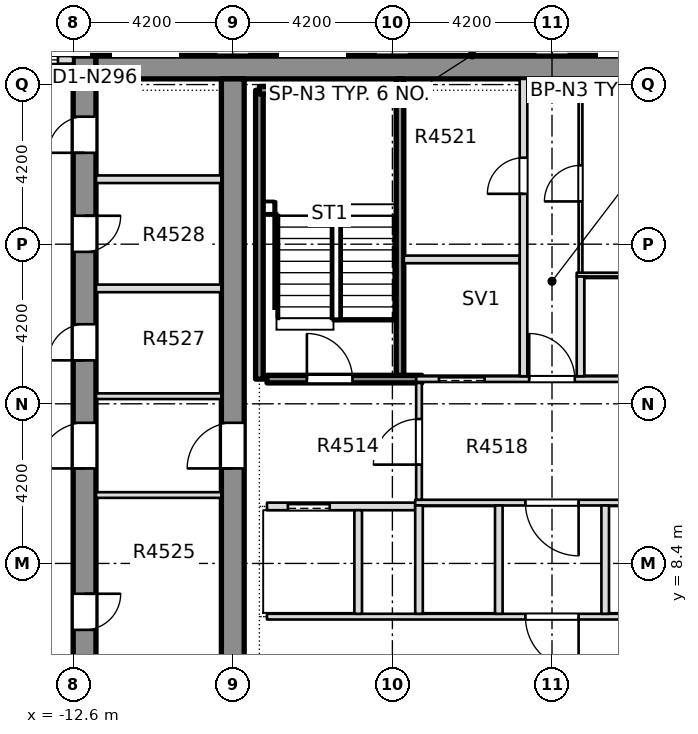
"""IFC4 building model, lengths in metres.
Left out: names, types, materials, properties, quantities, classifications, styles, units other than length and angle.
Written with IfcOpenShell. Run it as: python <this file> out.ifc"""

import sys

from ifc_helpers import new_model, si_unit, direction, frame, frame_2d, origin, place, context, subcontext, project, spatial, rectangle, extrude, element, fill, save


model = new_model("IFC4")
c1 = context("Model", 3, precision=1e-05, world=origin(), true_north=direction((0.0, 1.0)))
c2 = subcontext(c1, "Body", "Model", "MODEL_VIEW")
j1 = project(units=[si_unit("LENGTHUNIT", "METRE"), si_unit("PLANEANGLEUNIT", "RADIAN")], contexts=[c1])
p1 = place(None, origin())
s1 = spatial("IfcSite", under=j1, at=p1, CompositionType="ELEMENT")
p2 = place(p1, origin())
s2 = spatial("IfcBuilding", under=s1, at=p2, CompositionType="ELEMENT")
p3 = place(p2, frame((0.0, 0.0, 175.55)))
s3 = spatial("IfcBuildingStorey", under=s2, at=p3, CompositionType="ELEMENT", Elevation=175.55)
p4 = place(p3, frame((-12.3, -8.4, -0.4), z_axis=(0.0, 0.0, 1.0), x_axis=(0.0, 1.0, 0.0)))
e1 = element("IfcWall", 1, at=p4, inside=s3, PredefinedType="SHEAR", context=c2, shape_type="SweptSolid", body=[
    extrude(rectangle(XDim=30.15, YDim=0.6, at=frame_2d((15.075, 0.0))), origin(), (0.0, 0.0, 1.0), 3.45),
])
p5 = place(p4, frame((4.113, 0.0, 0.4)))
e2 = element("IfcOpeningElement", 2, at=p5, cuts=e1, PredefinedType="OPENING", context=c2, shape_type="SweptSolid", body=[
    extrude(rectangle(XDim=0.95, YDim=2.1, at=frame_2d((0.475, 1.05))), frame((0.0, 0.31, 0.0), z_axis=(0.0, -1.0, 0.0), x_axis=(1.0, 0.0, 0.0)), (0.0, 0.0, 1.0), 0.62),
])
p6 = place(p4, frame((9.89, 0.0, 0.4)))
e3 = element("IfcOpeningElement", 3, at=p6, cuts=e1, PredefinedType="OPENING", context=c2, shape_type="SweptSolid", body=[
    extrude(rectangle(XDim=0.95, YDim=2.1, at=frame_2d((0.475, 1.05))), frame((0.0, 0.31, 0.0), z_axis=(0.0, -1.0, 0.0), x_axis=(1.0, 0.0, 0.0)), (0.0, 0.0, 1.0), 0.62),
])
p7 = place(p4, frame((15.052, 0.0, 0.4)))
e4 = element("IfcOpeningElement", 4, at=p7, cuts=e1, PredefinedType="OPENING", context=c2, shape_type="SweptSolid", body=[
    extrude(rectangle(XDim=0.95, YDim=2.1, at=frame_2d((0.475, 1.05))), frame((0.0, 0.31, 0.0), z_axis=(0.0, -1.0, 0.0), x_axis=(1.0, 0.0, 0.0)), (0.0, 0.0, 1.0), 0.62),
])
p8 = place(p4, frame((22.144, 0.0, 0.4)))
e5 = element("IfcOpeningElement", 5, at=p8, cuts=e1, PredefinedType="OPENING", context=c2, shape_type="SweptSolid", body=[
    extrude(rectangle(XDim=0.95, YDim=2.1, at=frame_2d((0.475, 1.05))), frame((0.0, 0.31, 0.0), z_axis=(0.0, -1.0, 0.0), x_axis=(1.0, 0.0, 0.0)), (0.0, 0.0, 1.0), 0.62),
])
p9 = place(p4, frame((24.998, 0.0, 0.4)))
e6 = element("IfcOpeningElement", 6, at=p9, cuts=e1, PredefinedType="OPENING", context=c2, shape_type="SweptSolid", body=[
    extrude(rectangle(XDim=0.95, YDim=2.1, at=frame_2d((0.475, 1.05))), frame((0.0, 0.31, 0.0), z_axis=(0.0, -1.0, 0.0), x_axis=(1.0, 0.0, 0.0)), (0.0, 0.0, 1.0), 0.62),
])
p10 = place(p4, frame((27.605, 0.0, 0.4)))
e7 = element("IfcOpeningElement", 7, at=p10, cuts=e1, PredefinedType="OPENING", context=c2, shape_type="SweptSolid", body=[
    extrude(rectangle(XDim=0.95, YDim=2.1, at=frame_2d((0.475, 1.05))), frame((0.0, 0.31, 0.0), z_axis=(0.0, -1.0, 0.0), x_axis=(1.0, 0.0, 0.0)), (0.0, 0.0, 1.0), 0.62),
])
p11 = place(p4, frame((19.3, 0.0, 0.4)))
e8 = element("IfcOpeningElement", 8, at=p11, cuts=e1, PredefinedType="OPENING", context=c2, shape_type="SweptSolid", body=[
    extrude(rectangle(XDim=1.2, YDim=2.1, at=frame_2d((0.6, 1.05))), frame((0.0, 0.31, 0.0), z_axis=(0.0, -1.0, 0.0), x_axis=(1.0, 0.0, 0.0)), (0.0, 0.0, 1.0), 0.62),
])
p12 = place(p3, frame((-12.0, 21.45, -0.4), z_axis=(0.0, 0.0, 1.0), x_axis=(1.0, 0.0, 0.0)))
e9 = element("IfcWall", 9, at=p12, inside=s3, PredefinedType="SHEAR", context=c2, shape_type="SweptSolid", body=[
    extrude(rectangle(XDim=24.0, YDim=0.6, at=frame_2d((12.0, 0.0))), origin(), (0.0, 0.0, 1.0), 3.45),
])
p13 = place(p3, frame((-8.4, -7.8, -0.4), z_axis=(0.0, 0.0, 1.0), x_axis=(0.0, 1.0, 0.0)))
e10 = element("IfcWall", 10, at=p13, inside=s3, PredefinedType="SHEAR", context=c2, shape_type="SweptSolid", body=[
    extrude(rectangle(XDim=28.95, YDim=0.6, at=frame_2d((14.475, 0.0))), origin(), (0.0, 0.0, 1.0), 3.45),
])
p14 = place(p13, frame((18.7, 0.0, 0.4)))
e11 = element("IfcOpeningElement", 11, at=p14, cuts=e10, PredefinedType="OPENING", context=c2, shape_type="SweptSolid", body=[
    extrude(rectangle(XDim=1.2, YDim=2.1, at=frame_2d((0.6, 1.05))), frame((0.0, 0.31, 0.0), z_axis=(0.0, -1.0, 0.0), x_axis=(1.0, 0.0, 0.0)), (0.0, 0.0, 1.0), 0.62),
])
p15 = place(p3, frame((-12.6, 21.65, 0.0), z_axis=(0.0, 0.0, 1.0), x_axis=(-1.0, 0.0, 0.0)))
e12 = element("IfcWall", 12, at=p15, inside=s3, PredefinedType="STANDARD", context=c2, shape_type="SweptSolid", body=[
    extrude(rectangle(XDim=3.7, YDim=0.2, at=frame_2d((1.85, 0.0))), origin(), (0.0, 0.0, 1.0), 3.05),
])
p16 = place(p15, frame((0.4, 0.0, 0.2)))
e13 = element("IfcOpeningElement", 13, at=p16, cuts=e12, PredefinedType="OPENING", context=c2, shape_type="SweptSolid", body=[
    extrude(rectangle(XDim=1.8, YDim=2.65, at=frame_2d((0.9, 1.325))), frame((0.0, 0.11, 0.0), z_axis=(0.0, -1.0, 0.0), x_axis=(1.0, 0.0, 0.0)), (0.0, 0.0, 1.0), 0.22),
])
p17 = place(p15, frame((2.3, 0.0, 0.0)))
e14 = element("IfcOpeningElement", 14, at=p17, cuts=e12, PredefinedType="OPENING", context=c2, shape_type="SweptSolid", body=[
    extrude(rectangle(XDim=1.0, YDim=2.4, at=frame_2d((0.5, 1.2))), frame((0.0, 0.11, 0.0), z_axis=(0.0, -1.0, 0.0), x_axis=(1.0, 0.0, 0.0)), (0.0, 0.0, 1.0), 0.22),
])
p18 = place(p3, frame((-7.5, 7.0, 0.0), z_axis=(0.0, 0.0, 1.0), x_axis=(1.0, 0.0, 0.0)))
e15 = element("IfcWall", 15, at=p18, inside=s3, PredefinedType="PARTITIONING", context=c2, shape_type="SweptSolid", body=[
    extrude(rectangle(XDim=15.0, YDim=0.15, at=frame_2d((7.5, 0.0))), origin(), (0.0, 0.0, 1.0), 3.05),
])
p19 = place(p18, frame((6.8, 0.0, 0.0)))
e16 = element("IfcOpeningElement", 16, at=p19, cuts=e15, PredefinedType="OPENING", context=c2, shape_type="SweptSolid", body=[
    extrude(rectangle(XDim=1.4, YDim=2.1, at=frame_2d((0.7, 1.05))), frame((0.0, 0.085, 0.0), z_axis=(0.0, -1.0, 0.0), x_axis=(1.0, 0.0, 0.0)), (0.0, 0.0, 1.0), 0.17),
])
p20 = place(p3, frame((-7.5, 9.9, 0.0), z_axis=(0.0, 0.0, 1.0), x_axis=(1.0, 0.0, 0.0)))
e17 = element("IfcWall", 17, at=p20, inside=s3, PredefinedType="PARTITIONING", context=c2, shape_type="SweptSolid", body=[
    extrude(rectangle(XDim=3.9, YDim=0.2, at=frame_2d((1.95, 0.0))), origin(), (0.0, 0.0, 1.0), 3.05),
])
p21 = place(p20, frame((0.55, 0.0, 0.0)))
e18 = element("IfcOpeningElement", 18, at=p21, cuts=e17, PredefinedType="OPENING", context=c2, shape_type="SweptSolid", body=[
    extrude(rectangle(XDim=1.1, YDim=2.1, at=frame_2d((0.55, 1.05))), frame((0.0, 0.11, 0.0), z_axis=(0.0, -1.0, 0.0), x_axis=(1.0, 0.0, 0.0)), (0.0, 0.0, 1.0), 0.22),
])
p22 = place(p3, frame((-3.6, 10.0, 0.0), z_axis=(0.0, 0.0, 1.0), x_axis=(1.0, 0.0, 0.0)))
e19 = element("IfcWall", 19, at=p22, inside=s3, PredefinedType="PARTITIONING", context=c2, shape_type="SweptSolid", body=[
    extrude(rectangle(XDim=7.2, YDim=0.15, at=frame_2d((3.6, 0.0))), origin(), (0.0, 0.0, 1.0), 3.05),
])
p23 = place(p22, frame((2.9, 0.0, 0.0)))
e20 = element("IfcOpeningElement", 20, at=p23, cuts=e19, PredefinedType="OPENING", context=c2, shape_type="SweptSolid", body=[
    extrude(rectangle(XDim=1.4, YDim=2.1, at=frame_2d((0.7, 1.05))), frame((0.0, 0.085, 0.0), z_axis=(0.0, -1.0, 0.0), x_axis=(1.0, 0.0, 0.0)), (0.0, 0.0, 1.0), 0.17),
])
p24 = place(p3, frame((-7.5, 13.25, 0.0), z_axis=(0.0, 0.0, 1.0), x_axis=(1.0, 0.0, 0.0)))
e21 = element("IfcWall", 21, at=p24, inside=s3, PredefinedType="SOLIDWALL", context=c2, shape_type="SweptSolid", body=[
    extrude(rectangle(XDim=4.075, YDim=0.2, at=frame_2d((2.038, 0.0))), origin(), (0.0, 0.0, 1.0), 3.05),
])
p25 = place(p24, frame((1.05, 0.0, 0.0)))
e22 = element("IfcOpeningElement", 22, at=p25, cuts=e21, PredefinedType="OPENING", context=c2, shape_type="SweptSolid", body=[
    extrude(rectangle(XDim=1.2, YDim=2.1, at=frame_2d((0.6, 1.05))), frame((0.0, 0.11, 0.0), z_axis=(0.0, -1.0, 0.0), x_axis=(1.0, 0.0, 0.0)), (0.0, 0.0, 1.0), 0.22),
])
p26 = place(p3, frame((-3.575, 13.25, 0.0), z_axis=(0.0, 0.0, 1.0), x_axis=(1.0, 0.0, 0.0)))
e23 = element("IfcWall", 23, at=p26, inside=s3, PredefinedType="PARTITIONING", context=c2, shape_type="SweptSolid", body=[
    extrude(rectangle(XDim=7.15, YDim=0.15, at=frame_2d((3.575, 0.0))), origin(), (0.0, 0.0, 1.0), 3.05),
])
p27 = place(p26, frame((0.6, 0.0, 0.0)))
e24 = element("IfcOpeningElement", 24, at=p27, cuts=e23, PredefinedType="OPENING", context=c2, shape_type="SweptSolid", body=[
    extrude(rectangle(XDim=1.2, YDim=2.1, at=frame_2d((0.6, 1.05))), frame((0.0, 0.085, 0.0), z_axis=(0.0, -1.0, 0.0), x_axis=(1.0, 0.0, 0.0)), (0.0, 0.0, 1.0), 0.17),
])
p28 = place(p26, frame((5.4, 0.0, 0.0)))
e25 = element("IfcOpeningElement", 25, at=p28, cuts=e23, PredefinedType="OPENING", context=c2, shape_type="SweptSolid", body=[
    extrude(rectangle(XDim=1.1, YDim=2.1, at=frame_2d((0.55, 1.05))), frame((0.0, 0.085, 0.0), z_axis=(0.0, -1.0, 0.0), x_axis=(1.0, 0.0, 0.0)), (0.0, 0.0, 1.0), 0.17),
])
p29 = place(p26, frame((2.975, 0.0, 0.0)))
e26 = element("IfcOpeningElement", 26, at=p29, cuts=e23, PredefinedType="OPENING", context=c2, shape_type="SweptSolid", body=[
    extrude(rectangle(XDim=1.2, YDim=2.1, at=frame_2d((0.6, 1.05))), frame((0.0, 0.085, 0.0), z_axis=(0.0, -1.0, 0.0), x_axis=(1.0, 0.0, 0.0)), (0.0, 0.0, 1.0), 0.17),
])
p30 = place(p3, frame((0.65, 16.0, 0.0), z_axis=(0.0, 0.0, 1.0), x_axis=(1.0, 0.0, 0.0)))
e27 = element("IfcWall", 27, at=p30, inside=s3, PredefinedType="PARTITIONING", context=c2, shape_type="SweptSolid", body=[
    extrude(rectangle(XDim=3.45, YDim=0.1, at=frame_2d((1.725, 0.0))), origin(), (0.0, 0.0, 1.0), 3.05),
])
p31 = place(p3, frame((-3.9, 16.4, 0.0), z_axis=(0.0, 0.0, 1.0), x_axis=(1.0, 0.0, 0.0)))
e28 = element("IfcWall", 28, at=p31, inside=s3, PredefinedType="PARTITIONING", context=c2, shape_type="SweptSolid", body=[
    extrude(rectangle(XDim=3.05, YDim=0.2, at=frame_2d((1.525, 0.0))), origin(), (0.0, 0.0, 1.0), 3.05),
])
p32 = place(p3, frame((-5.1, 7.075, 0.0), z_axis=(0.0, 0.0, 1.0), x_axis=(0.0, 1.0, 0.0)))
e29 = element("IfcWall", 29, at=p32, inside=s3, PredefinedType="PARTITIONING", context=c2, shape_type="SweptSolid", body=[
    extrude(rectangle(XDim=2.725, YDim=0.2, at=frame_2d((1.363, 0.0))), origin(), (0.0, 0.0, 1.0), 3.05),
])
p33 = place(p3, frame((-4.0, 13.35, 0.0), z_axis=(0.0, 0.0, 1.0), x_axis=(0.0, 1.0, 0.0)))
e30 = element("IfcWall", 30, at=p33, inside=s3, PredefinedType="SOLIDWALL", context=c2, shape_type="SweptSolid", body=[
    extrude(rectangle(XDim=7.799, YDim=0.2, at=frame_2d((3.899, 0.0))), origin(), (0.0, 0.0, 1.0), 3.05),
])
p34 = place(p3, frame((-3.5, 7.075, 0.0), z_axis=(0.0, 0.0, 1.0), x_axis=(0.0, 1.0, 0.0)))
e31 = element("IfcWall", 31, at=p34, inside=s3, PredefinedType="PARTITIONING", context=c2, shape_type="SweptSolid", body=[
    extrude(rectangle(XDim=2.85, YDim=0.2, at=frame_2d((1.425, 0.0))), origin(), (0.0, 0.0, 1.0), 3.05),
])
p35 = place(p3, frame((-3.5, 10.075, 0.0), z_axis=(0.0, 0.0, 1.0), x_axis=(0.0, 1.0, 0.0)))
e32 = element("IfcWall", 32, at=p35, inside=s3, PredefinedType="PARTITIONING", context=c2, shape_type="SweptSolid", body=[
    extrude(rectangle(XDim=3.075, YDim=0.15, at=frame_2d((1.538, 0.0))), origin(), (0.0, 0.0, 1.0), 3.05),
])
p36 = place(p35, frame((0.925, 0.0, 0.0)))
e33 = element("IfcOpeningElement", 33, at=p36, cuts=e32, PredefinedType="OPENING", context=c2, shape_type="SweptSolid", body=[
    extrude(rectangle(XDim=1.2, YDim=2.1, at=frame_2d((0.6, 1.05))), frame((0.0, 0.085, 0.0), z_axis=(0.0, -1.0, 0.0), x_axis=(1.0, 0.0, 0.0)), (0.0, 0.0, 1.0), 0.17),
])
p37 = place(p3, frame((-1.4, 7.075, 0.0), z_axis=(0.0, 0.0, 1.0), x_axis=(0.0, 1.0, 0.0)))
e34 = element("IfcWall", 34, at=p37, inside=s3, PredefinedType="PARTITIONING", context=c2, shape_type="SweptSolid", body=[
    extrude(rectangle(XDim=2.85, YDim=0.2, at=frame_2d((1.425, 0.0))), origin(), (0.0, 0.0, 1.0), 3.05),
])
p38 = place(p3, frame((-0.75, 13.325, 0.0), z_axis=(0.0, 0.0, 1.0), x_axis=(0.0, 1.0, 0.0)))
e35 = element("IfcWall", 35, at=p38, inside=s3, PredefinedType="PARTITIONING", context=c2, shape_type="SweptSolid", body=[
    extrude(rectangle(XDim=7.824, YDim=0.2, at=frame_2d((3.912, 0.0))), origin(), (0.0, 0.0, 1.0), 3.05),
])
p39 = place(p38, frame((4.8, 0.0, 0.0)))
e36 = element("IfcOpeningElement", 36, at=p39, cuts=e35, PredefinedType="OPENING", context=c2, shape_type="SweptSolid", body=[
    extrude(rectangle(XDim=0.95, YDim=2.1, at=frame_2d((0.475, 1.05))), frame((0.0, 0.11, 0.0), z_axis=(0.0, -1.0, 0.0), x_axis=(1.0, 0.0, 0.0)), (0.0, 0.0, 1.0), 0.22),
])
p40 = place(p3, frame((0.75, 13.325, 0.0), z_axis=(0.0, 0.0, 1.0), x_axis=(0.0, 1.0, 0.0)))
e37 = element("IfcWall", 37, at=p40, inside=s3, PredefinedType="PARTITIONING", context=c2, shape_type="SweptSolid", body=[
    extrude(rectangle(XDim=2.625, YDim=0.2, at=frame_2d((1.312, 0.0))), origin(), (0.0, 0.0, 1.0), 3.05),
])
p41 = place(p3, frame((0.75, 16.05, 0.0), z_axis=(0.0, 0.0, 1.0), x_axis=(0.0, 1.0, 0.0)))
e38 = element("IfcWall", 38, at=p41, inside=s3, PredefinedType="PARTITIONING", context=c2, shape_type="SweptSolid", body=[
    extrude(rectangle(XDim=5.099, YDim=0.1, at=frame_2d((2.549, 0.0))), origin(), (0.0, 0.0, 1.0), 3.05),
])
p42 = place(p41, frame((1.875, 0.0, 0.0)))
e39 = element("IfcOpeningElement", 39, at=p42, cuts=e38, PredefinedType="OPENING", context=c2, shape_type="SweptSolid", body=[
    extrude(rectangle(XDim=0.95, YDim=2.1, at=frame_2d((0.475, 1.05))), frame((0.0, 0.06, 0.0), z_axis=(0.0, -1.0, 0.0), x_axis=(1.0, 0.0, 0.0)), (0.0, 0.0, 1.0), 0.12),
])
p43 = place(p3, frame((1.4, 7.075, 0.0), z_axis=(0.0, 0.0, 1.0), x_axis=(0.0, 1.0, 0.0)))
e40 = element("IfcWall", 40, at=p43, inside=s3, PredefinedType="PARTITIONING", context=c2, shape_type="SweptSolid", body=[
    extrude(rectangle(XDim=2.85, YDim=0.2, at=frame_2d((1.425, 0.0))), origin(), (0.0, 0.0, 1.0), 3.05),
])
for number, where, z_axis, x_axis in (
    (41, (-11.999, 10.2, 0.0), (0.0, 0.0, 1.0), (1.0, 0.0, 0.0)),
    (42, (-11.999, 12.8, 0.0), (0.0, 0.0, 1.0), (1.0, 0.0, 0.0)),
):
    element("IfcWall", number, at=place(p3, frame(where, z_axis=z_axis, x_axis=x_axis)), inside=s3, PredefinedType="PARTITIONING", context=c2, shape_type="SweptSolid", body=[
        extrude(rectangle(XDim=3.298, YDim=0.15, at=frame_2d((1.649, 0.0))), origin(), (0.0, 0.0, 1.0), 3.05),
    ])
for number, where, z_axis, x_axis in (
    (43, (-11.999, 15.637, 0.0), (0.0, 0.0, 1.0), (1.0, 0.0, 0.0)),
    (44, (-11.999, 18.509, 0.0), (0.0, 0.0, 1.0), (1.0, 0.0, 0.0)),
):
    element("IfcWall", number, at=place(p3, frame(where, z_axis=z_axis, x_axis=x_axis)), inside=s3, PredefinedType="PARTITIONING", context=c2, shape_type="SweptSolid", body=[
        extrude(rectangle(XDim=3.298, YDim=0.2, at=frame_2d((1.649, 0.0))), origin(), (0.0, 0.0, 1.0), 3.05),
    ])
p44 = place(p3, frame((-7.7, 13.25, 0.0), z_axis=(0.0, 0.0, 1.0), x_axis=(0.0, 1.0, 0.0)))
e45 = element("IfcWall", 45, at=p44, inside=s3, PredefinedType="SOLIDWALL", context=c2, shape_type="SweptSolid", body=[
    extrude(rectangle(XDim=7.6, YDim=0.2, at=frame_2d((3.8, 0.0))), origin(), (0.0, 0.0, 1.0), 3.05),
])
p45 = place(p3, frame((-7.7, 20.85, 0.0), z_axis=(0.0, 0.0, 1.0), x_axis=(1.0, 0.0, 0.0)))
e46 = element("IfcWall", 46, at=p45, inside=s3, PredefinedType="SOLIDWALL", context=c2, shape_type="SweptSolid", body=[
    extrude(rectangle(XDim=3.55, YDim=0.2, at=frame_2d((1.775, 0.0))), origin(), (0.0, 0.0, 1.0), 3.05),
])
p46 = place(p16, origin())
e47 = element("IfcWindow", 47, at=p46, inside=s3, PartitioningType="SINGLE_PANEL", PredefinedType="WINDOW", context=c2, shape_type="SweptSolid", body=[
    extrude(rectangle(XDim=1.8, YDim=2.65, at=frame_2d((0.9, 1.325))), frame((0.0, 0.03, 0.0), z_axis=(0.0, -1.0, 0.0), x_axis=(1.0, 0.0, 0.0)), (0.0, 0.0, 1.0), 0.06),
])
fill(e13, e47)
p47 = place(p25, origin())
e48 = element("IfcDoor", 48, at=p47, inside=s3, OperationType="SINGLE_SWING_LEFT", PredefinedType="DOOR", context=c2, shape_type="SweptSolid", body=[
    extrude(rectangle(XDim=1.2, YDim=2.1, at=frame_2d((0.6, 1.05))), frame((0.0, 0.025, 0.0), z_axis=(0.0, -1.0, 0.0), x_axis=(1.0, 0.0, 0.0)), (0.0, 0.0, 1.0), 0.05),
])
fill(e22, e48)
p48 = place(p21, origin())
e49 = element("IfcDoor", 49, at=p48, inside=s3, OperationType="SLIDING_TO_RIGHT", PredefinedType="DOOR", context=c2, shape_type="SweptSolid", body=[
    extrude(rectangle(XDim=1.1, YDim=2.1, at=frame_2d((0.55, 1.05))), frame((0.0, 0.025, 0.0), z_axis=(0.0, -1.0, 0.0), x_axis=(1.0, 0.0, 0.0)), (0.0, 0.0, 1.0), 0.05),
])
fill(e18, e49)
p49 = place(p19, origin())
e50 = element("IfcDoor", 50, at=p49, inside=s3, OperationType="SINGLE_SWING_RIGHT", PredefinedType="DOOR", context=c2, shape_type="SweptSolid", body=[
    extrude(rectangle(XDim=1.4, YDim=2.1, at=frame_2d((0.7, 1.05))), frame((0.0, 0.025, 0.0), z_axis=(0.0, -1.0, 0.0), x_axis=(1.0, 0.0, 0.0)), (0.0, 0.0, 1.0), 0.05),
])
fill(e16, e50)
p50 = place(p23, origin())
e51 = element("IfcDoor", 51, at=p50, inside=s3, OperationType="SINGLE_SWING_RIGHT", PredefinedType="DOOR", context=c2, shape_type="SweptSolid", body=[
    extrude(rectangle(XDim=1.4, YDim=2.1, at=frame_2d((0.7, 1.05))), frame((0.0, 0.025, 0.0), z_axis=(0.0, -1.0, 0.0), x_axis=(1.0, 0.0, 0.0)), (0.0, 0.0, 1.0), 0.05),
])
fill(e20, e51)
p51 = place(p27, origin())
e52 = element("IfcDoor", 52, at=p51, inside=s3, OperationType="SLIDING_TO_RIGHT", PredefinedType="DOOR", context=c2, shape_type="SweptSolid", body=[
    extrude(rectangle(XDim=1.2, YDim=2.1, at=frame_2d((0.6, 1.05))), frame((0.0, 0.025, 0.0), z_axis=(0.0, -1.0, 0.0), x_axis=(1.0, 0.0, 0.0)), (0.0, 0.0, 1.0), 0.05),
])
fill(e24, e52)
p52 = place(p29, origin())
e53 = element("IfcDoor", 53, at=p52, inside=s3, OperationType="SINGLE_SWING_RIGHT", PredefinedType="DOOR", context=c2, shape_type="SweptSolid", body=[
    extrude(rectangle(XDim=1.2, YDim=2.1, at=frame_2d((0.6, 1.05))), frame((0.0, 0.025, 0.0), z_axis=(0.0, -1.0, 0.0), x_axis=(1.0, 0.0, 0.0)), (0.0, 0.0, 1.0), 0.05),
])
fill(e26, e53)
p53 = place(p39, origin())
e54 = element("IfcDoor", 54, at=p53, inside=s3, OperationType="SINGLE_SWING_RIGHT", PredefinedType="DOOR", context=c2, shape_type="SweptSolid", body=[
    extrude(rectangle(XDim=0.95, YDim=2.1, at=frame_2d((0.475, 1.05))), frame((0.0, 0.025, 0.0), z_axis=(0.0, -1.0, 0.0), x_axis=(1.0, 0.0, 0.0)), (0.0, 0.0, 1.0), 0.05),
])
fill(e36, e54)
p54 = place(p42, origin())
e55 = element("IfcDoor", 55, at=p54, inside=s3, OperationType="SINGLE_SWING_LEFT", PredefinedType="DOOR", context=c2, shape_type="SweptSolid", body=[
    extrude(rectangle(XDim=0.95, YDim=2.1, at=frame_2d((0.475, 1.05))), frame((0.0, 0.025, 0.0), z_axis=(0.0, -1.0, 0.0), x_axis=(1.0, 0.0, 0.0)), (0.0, 0.0, 1.0), 0.05),
])
fill(e39, e55)
p55 = place(p36, origin())
e56 = element("IfcDoor", 56, at=p55, inside=s3, OperationType="SINGLE_SWING_RIGHT", PredefinedType="DOOR", context=c2, shape_type="SweptSolid", body=[
    extrude(rectangle(XDim=1.2, YDim=2.1, at=frame_2d((0.6, 1.05))), frame((0.0, 0.025, 0.0), z_axis=(0.0, -1.0, 0.0), x_axis=(1.0, 0.0, 0.0)), (0.0, 0.0, 1.0), 0.05),
])
fill(e33, e56)
p56 = place(p7, origin())
e57 = element("IfcDoor", 57, at=p56, inside=s3, OperationType="SINGLE_SWING_LEFT", PredefinedType="DOOR", context=c2, shape_type="SweptSolid", body=[
    extrude(rectangle(XDim=0.95, YDim=2.1, at=frame_2d((0.475, 1.05))), frame((0.0, 0.025, 0.0), z_axis=(0.0, -1.0, 0.0), x_axis=(1.0, 0.0, 0.0)), (0.0, 0.0, 1.0), 0.05),
])
fill(e4, e57)
p57 = place(p8, origin())
e58 = element("IfcDoor", 58, at=p57, inside=s3, OperationType="SINGLE_SWING_LEFT", PredefinedType="DOOR", context=c2, shape_type="SweptSolid", body=[
    extrude(rectangle(XDim=0.95, YDim=2.1, at=frame_2d((0.475, 1.05))), frame((0.0, 0.025, 0.0), z_axis=(0.0, -1.0, 0.0), x_axis=(1.0, 0.0, 0.0)), (0.0, 0.0, 1.0), 0.05),
])
fill(e5, e58)
p58 = place(p9, origin())
e59 = element("IfcDoor", 59, at=p58, inside=s3, OperationType="SINGLE_SWING_LEFT", PredefinedType="DOOR", context=c2, shape_type="SweptSolid", body=[
    extrude(rectangle(XDim=0.95, YDim=2.1, at=frame_2d((0.475, 1.05))), frame((0.0, 0.025, 0.0), z_axis=(0.0, -1.0, 0.0), x_axis=(1.0, 0.0, 0.0)), (0.0, 0.0, 1.0), 0.05),
])
fill(e6, e59)
p59 = place(p10, origin())
e60 = element("IfcDoor", 60, at=p59, inside=s3, OperationType="SINGLE_SWING_LEFT", PredefinedType="DOOR", context=c2, shape_type="SweptSolid", body=[
    extrude(rectangle(XDim=0.95, YDim=2.1, at=frame_2d((0.475, 1.05))), frame((0.0, 0.025, 0.0), z_axis=(0.0, -1.0, 0.0), x_axis=(1.0, 0.0, 0.0)), (0.0, 0.0, 1.0), 0.05),
])
fill(e7, e60)
p60 = place(p11, origin())
e61 = element("IfcDoor", 61, at=p60, inside=s3, OperationType="SINGLE_SWING_LEFT", PredefinedType="DOOR", context=c2, shape_type="SweptSolid", body=[
    extrude(rectangle(XDim=1.2, YDim=2.1, at=frame_2d((0.6, 1.05))), frame((0.0, 0.025, 0.0), z_axis=(0.0, -1.0, 0.0), x_axis=(1.0, 0.0, 0.0)), (0.0, 0.0, 1.0), 0.05),
])
fill(e8, e61)
p61 = place(p14, origin())
e62 = element("IfcDoor", 62, at=p61, inside=s3, OperationType="SINGLE_SWING_LEFT", PredefinedType="DOOR", context=c2, shape_type="SweptSolid", body=[
    extrude(rectangle(XDim=1.2, YDim=2.1, at=frame_2d((0.6, 1.05))), frame((0.0, 0.025, 0.0), z_axis=(0.0, -1.0, 0.0), x_axis=(1.0, 0.0, 0.0)), (0.0, 0.0, 1.0), 0.05),
])
fill(e11, e62)
save(model, sys.argv[1])
